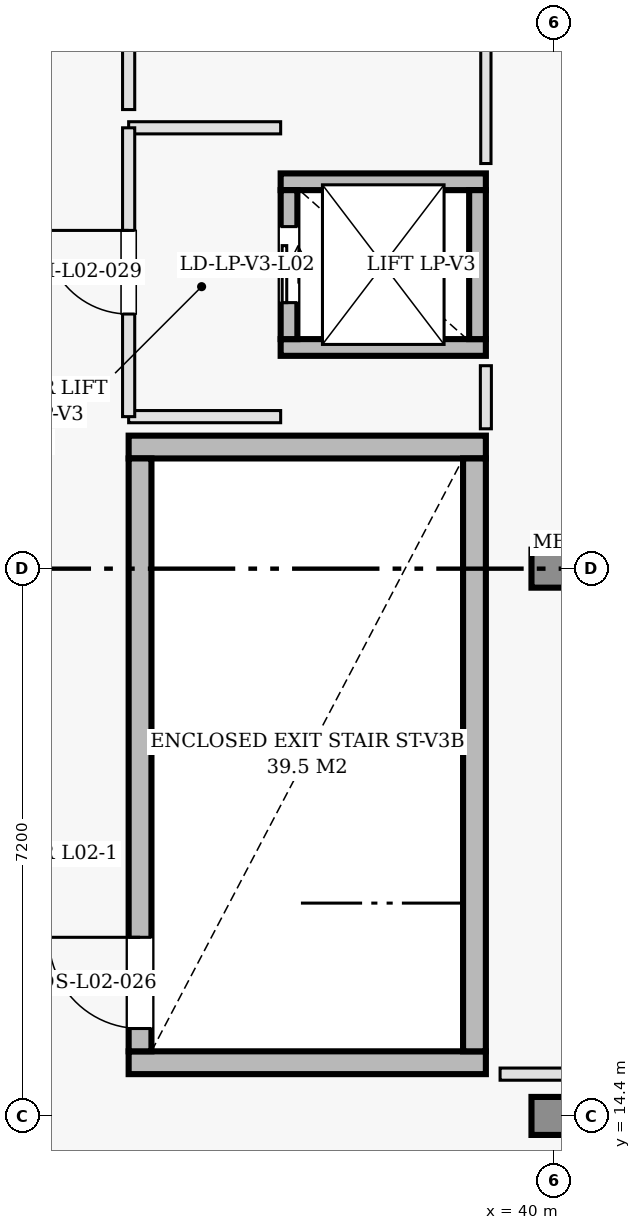
"""IFC4 building model, lengths in metres.
Left out: names, types, materials, properties, quantities, classifications, styles, units other than length and angle.
Written with IfcOpenShell. Run it as: python <this file> out.ifc"""

import sys

from ifc_helpers import new_model, si_unit, direction, frame, frame_2d, origin, origin_2d, place, context, subcontext, project, spatial, rectangle, extrude, element, fill, save


model = new_model("IFC4")
c1 = context("Model", 3, precision=1e-05, world=origin(), true_north=direction((0.0, 1.0)))
c2 = subcontext(c1, "Body", "Model", "MODEL_VIEW")
j1 = project(units=[si_unit("LENGTHUNIT", "METRE"), si_unit("PLANEANGLEUNIT", "RADIAN")], contexts=[c1])
p1 = place(None, origin())
s1 = spatial("IfcSite", under=j1, at=p1, CompositionType="ELEMENT")
p2 = place(p1, origin())
s2 = spatial("IfcBuilding", under=s1, at=p2, CompositionType="ELEMENT")
p3 = place(p2, frame((0.0, 0.0, 9.6)))
s3 = spatial("IfcBuildingStorey", under=s2, at=p3, CompositionType="ELEMENT", Elevation=9.6)
for number, where, z_axis, x_axis in (
    (1, (40.0, 14.4, 0.0), (0.0, 0.0, 1.0), (1.0, 0.0, 0.0)),
    (2, (40.0, 21.6, 0.0), (0.0, 0.0, 1.0), (1.0, 0.0, 0.0)),
):
    element("IfcColumn", number, at=place(p3, frame(where, z_axis=z_axis, x_axis=x_axis)), inside=s3, PredefinedType="COLUMN", context=c2, shape_type="SweptSolid", body=[
        extrude(rectangle(XDim=0.5, YDim=0.5, at=origin_2d()), origin(), (0.0, 0.0, 1.0), 4.2),
    ])
for number, where, z_axis, x_axis in (
    (3, (34.4, 15.1, 0.0), (0.0, 0.0, 1.0), (1.0, 0.0, 0.0)),
    (4, (34.4, 23.2, 0.0), (0.0, 0.0, 1.0), (1.0, 0.0, 0.0)),
):
    element("IfcWall", number, at=place(p3, frame(where, z_axis=z_axis, x_axis=x_axis)), inside=s3, PredefinedType="SHEAR", context=c2, shape_type="SweptSolid", body=[
        extrude(rectangle(XDim=4.7, YDim=0.3, at=frame_2d((2.35, 0.0))), origin(), (0.0, 0.0, 1.0), 4.0),
    ])
p4 = place(p3, frame((34.55, 15.25, 0.0), z_axis=(0.0, 0.0, 1.0), x_axis=(0.0, 1.0, 0.0)))
e5 = element("IfcWall", 5, at=p4, inside=s3, PredefinedType="SHEAR", context=c2, shape_type="SweptSolid", body=[
    extrude(rectangle(XDim=7.8, YDim=0.3, at=frame_2d((3.9, 0.0))), origin(), (0.0, 0.0, 1.0), 4.0),
])
p5 = place(p4, frame((0.3, 0.0, 0.0)))
e6 = element("IfcOpeningElement", 6, at=p5, cuts=e5, PredefinedType="OPENING", context=c2, shape_type="SweptSolid", body=[
    extrude(rectangle(XDim=1.2, YDim=2.15, at=frame_2d((0.6, 1.075))), frame((0.0, 0.16, 0.0), z_axis=(0.0, -1.0, 0.0), x_axis=(1.0, 0.0, 0.0)), (0.0, 0.0, 1.0), 0.32),
])
p6 = place(p3, frame((38.95, 15.25, 0.0), z_axis=(0.0, 0.0, 1.0), x_axis=(0.0, 1.0, 0.0)))
e7 = element("IfcWall", 7, at=p6, inside=s3, PredefinedType="SHEAR", context=c2, shape_type="SweptSolid", body=[
    extrude(rectangle(XDim=7.8, YDim=0.3, at=frame_2d((3.9, 0.0))), origin(), (0.0, 0.0, 1.0), 4.0),
])
for number, where, z_axis, x_axis in (
    (8, (36.4, 24.51, 0.0), (0.0, 0.0, 1.0), (1.0, 0.0, 0.0)),
    (9, (36.4, 26.69, 0.0), (0.0, 0.0, 1.0), (1.0, 0.0, 0.0)),
):
    element("IfcWall", number, at=place(p3, frame(where, z_axis=z_axis, x_axis=x_axis)), inside=s3, PredefinedType="SHEAR", context=c2, shape_type="SweptSolid", body=[
        extrude(rectangle(XDim=2.7, YDim=0.22, at=frame_2d((1.35, 0.0))), origin(), (0.0, 0.0, 1.0), 3.85),
    ])
p7 = place(p3, frame((36.51, 24.62, 0.0), z_axis=(0.0, 0.0, 1.0), x_axis=(0.0, 1.0, 0.0)))
e10 = element("IfcWall", 10, at=p7, inside=s3, PredefinedType="SHEAR", context=c2, shape_type="SweptSolid", body=[
    extrude(rectangle(XDim=1.96, YDim=0.22, at=frame_2d((0.98, 0.0))), origin(), (0.0, 0.0, 1.0), 3.85),
])
p8 = place(p7, frame((0.48, 0.0, 0.0)))
e11 = element("IfcOpeningElement", 11, at=p8, cuts=e10, PredefinedType="OPENING", context=c2, shape_type="SweptSolid", body=[
    extrude(rectangle(XDim=1.0, YDim=2.15, at=frame_2d((0.5, 1.075))), frame((0.0, 0.12, 0.0), z_axis=(0.0, -1.0, 0.0), x_axis=(1.0, 0.0, 0.0)), (0.0, 0.0, 1.0), 0.24),
])
p9 = place(p3, frame((38.99, 24.62, 0.0), z_axis=(0.0, 0.0, 1.0), x_axis=(0.0, 1.0, 0.0)))
e12 = element("IfcWall", 12, at=p9, inside=s3, PredefinedType="SHEAR", context=c2, shape_type="SweptSolid", body=[
    extrude(rectangle(XDim=1.96, YDim=0.22, at=frame_2d((0.98, 0.0))), origin(), (0.0, 0.0, 1.0), 3.85),
])
for number, where, z_axis, x_axis in (
    (13, (34.4, 23.6, 0.0), (0.0, 0.0, 1.0), (1.0, 0.0, 0.0)),
    (14, (34.4, 27.4, 0.0), (0.0, 0.0, 1.0), (1.0, 0.0, 0.0)),
):
    element("IfcWall", number, at=place(p3, frame(where, z_axis=z_axis, x_axis=x_axis)), inside=s3, PredefinedType="PARTITIONING", context=c2, shape_type="SweptSolid", body=[
        extrude(rectangle(XDim=2.0, YDim=0.16, at=frame_2d((1.0, 0.0))), origin(), (0.0, 0.0, 1.0), 3.85),
    ])
p10 = place(p3, frame((34.4, 23.6, 0.0), z_axis=(0.0, 0.0, 1.0), x_axis=(0.0, 1.0, 0.0)))
e15 = element("IfcWall", 15, at=p10, inside=s3, PredefinedType="PARTITIONING", context=c2, shape_type="SweptSolid", body=[
    extrude(rectangle(XDim=3.8, YDim=0.16, at=frame_2d((1.9, 0.0))), origin(), (0.0, 0.0, 1.0), 3.85),
])
p11 = place(p10, frame((1.35, 0.0, 0.0)))
e16 = element("IfcOpeningElement", 16, at=p11, cuts=e15, PredefinedType="OPENING", context=c2, shape_type="SweptSolid", body=[
    extrude(rectangle(XDim=1.1, YDim=2.15, at=frame_2d((0.55, 1.075))), frame((0.0, 0.09, 0.0), z_axis=(0.0, -1.0, 0.0), x_axis=(1.0, 0.0, 0.0)), (0.0, 0.0, 1.0), 0.18),
])
p12 = place(p3, frame((39.287, 14.95, 0.0), z_axis=(0.0, 0.0, 1.0), x_axis=(1.0, 0.0, 0.0)))
e17 = element("IfcWall", 17, at=p12, inside=s3, PredefinedType="PARTITIONING", context=c2, shape_type="SweptSolid", body=[
    extrude(rectangle(XDim=8.408, YDim=0.16, at=frame_2d((4.204, 0.0))), origin(), (0.0, 0.0, 1.0), 3.94),
])
p13 = place(p12, frame((3.654, 0.0, 0.0)))
e18 = element("IfcOpeningElement", 18, at=p13, cuts=e17, PredefinedType="OPENING", context=c2, shape_type="SweptSolid", body=[
    extrude(rectangle(XDim=1.1, YDim=2.15, at=frame_2d((0.55, 1.075))), frame((0.0, 0.09, 0.0), z_axis=(0.0, -1.0, 0.0), x_axis=(1.0, 0.0, 0.0)), (0.0, 0.0, 1.0), 0.18),
])
p14 = place(p3, frame((39.1, 23.44, 0.0), z_axis=(0.0, 0.0, 1.0), x_axis=(0.0, 1.0, 0.0)))
e19 = element("IfcWall", 19, at=p14, inside=s3, PredefinedType="PARTITIONING", context=c2, shape_type="SweptSolid", body=[
    extrude(rectangle(XDim=0.83, YDim=0.145, at=frame_2d((0.415, 0.0))), origin(), (0.0, 0.0, 1.0), 3.94),
])
p15 = place(p3, frame((39.1, 26.93, 0.0), z_axis=(0.0, 0.0, 1.0), x_axis=(0.0, 1.0, 0.0)))
e20 = element("IfcWall", 20, at=p15, inside=s3, PredefinedType="PARTITIONING", context=c2, shape_type="SweptSolid", body=[
    extrude(rectangle(XDim=1.815, YDim=0.135, at=frame_2d((0.908, 0.0))), origin(), (0.0, 0.0, 1.0), 3.94),
])
p16 = place(p3, frame((34.4, 27.64, 0.0), z_axis=(0.0, 0.0, 1.0), x_axis=(0.0, 1.0, 0.0)))
e21 = element("IfcWall", 21, at=p16, inside=s3, PredefinedType="PARTITIONING", context=c2, shape_type="SweptSolid", body=[
    extrude(rectangle(XDim=1.105, YDim=0.16, at=frame_2d((0.553, 0.0))), origin(), (0.0, 0.0, 1.0), 3.94),
])
p17 = place(p5, origin())
e22 = element("IfcDoor", 22, at=p17, inside=s3, OperationType="SINGLE_SWING_RIGHT", PredefinedType="DOOR", context=c2, shape_type="SweptSolid", body=[
    extrude(rectangle(XDim=1.2, YDim=2.15, at=frame_2d((0.6, 1.075))), frame((0.0, 0.025, 0.0), z_axis=(0.0, -1.0, 0.0), x_axis=(1.0, 0.0, 0.0)), (0.0, 0.0, 1.0), 0.05),
])
fill(e6, e22)
p18 = place(p8, origin())
e23 = element("IfcDoor", 23, at=p18, inside=s3, OperationType="SLIDING_TO_LEFT", PredefinedType="DOOR", context=c2, shape_type="SweptSolid", body=[
    extrude(rectangle(XDim=1.0, YDim=2.15, at=frame_2d((0.5, 1.075))), frame((0.0, 0.025, 0.0), z_axis=(0.0, -1.0, 0.0), x_axis=(1.0, 0.0, 0.0)), (0.0, 0.0, 1.0), 0.05),
])
fill(e11, e23)
p19 = place(p11, origin())
e24 = element("IfcDoor", 24, at=p19, inside=s3, OperationType="SINGLE_SWING_RIGHT", PredefinedType="DOOR", context=c2, shape_type="SweptSolid", body=[
    extrude(rectangle(XDim=1.1, YDim=2.15, at=frame_2d((0.55, 1.075))), frame((0.0, 0.025, 0.0), z_axis=(0.0, -1.0, 0.0), x_axis=(1.0, 0.0, 0.0)), (0.0, 0.0, 1.0), 0.05),
])
fill(e16, e24)
save(model, sys.argv[1])
